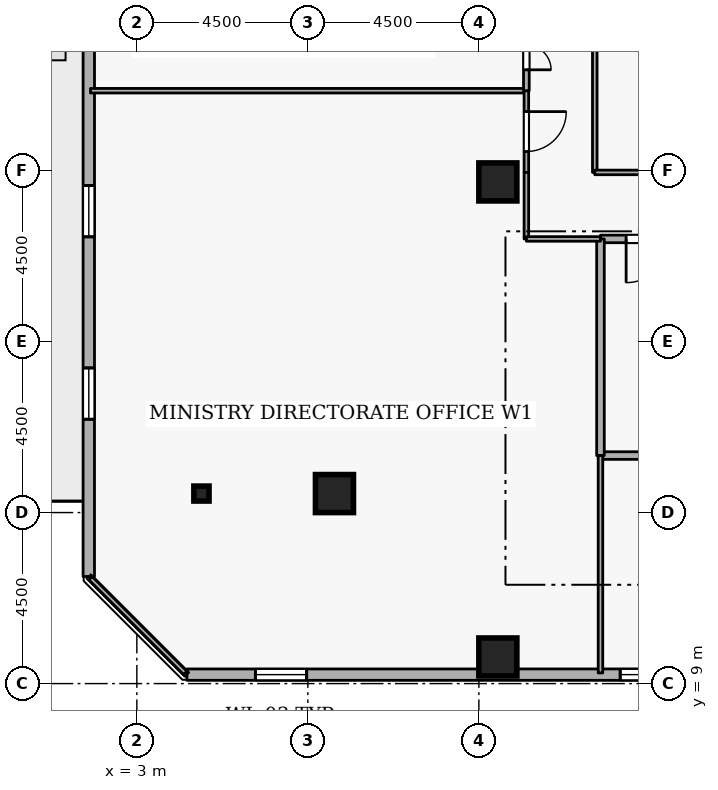
"""IFC4 building model, lengths in metres.
Left out: names, types, materials, properties, quantities, classifications, styles, units other than length and angle.
Written with IfcOpenShell. Run it as: python <this file> out.ifc"""

import sys

from ifc_helpers import new_model, si_unit, direction, frame, frame_2d, origin, origin_2d, place, context, subcontext, project, spatial, rectangle, i_section, extrude, element, fill, save


model = new_model("IFC4")
c1 = context("Model", 3, precision=1e-05, world=origin(), true_north=direction((0.0, 1.0)))
c2 = subcontext(c1, "Body", "Model", "MODEL_VIEW")
j1 = project(units=[si_unit("LENGTHUNIT", "METRE"), si_unit("PLANEANGLEUNIT", "RADIAN")], contexts=[c1])
p1 = place(None, origin())
s1 = spatial("IfcSite", under=j1, at=p1, CompositionType="ELEMENT")
p2 = place(p1, origin())
s2 = spatial("IfcBuilding", under=s1, at=p2, CompositionType="ELEMENT")
p3 = place(p2, frame((0.0, 0.0, 218.1)))
s3 = spatial("IfcBuildingStorey", under=s2, at=p3, CompositionType="ELEMENT", Elevation=218.1)
for number, where, z_axis, x_axis in (
    (1, (12.5, 9.7, 0.0), (0.0, 0.0, 1.0), (1.0, 0.0, 0.0)),
    (2, (8.2, 14.0, 0.0), (0.0, 0.0, 1.0), (1.0, 0.0, 0.0)),
    (3, (12.5, 22.2, 0.0), (0.0, 0.0, 1.0), (1.0, 0.0, 0.0)),
):
    element("IfcColumn", number, at=place(p3, frame(where, z_axis=z_axis, x_axis=x_axis)), inside=s3, PredefinedType="COLUMN", context=c2, shape_type="SweptSolid", body=[
        extrude(rectangle(XDim=1.0, YDim=1.0, at=origin_2d()), origin(), (0.0, 0.0, 1.0), 3.6),
    ])
p4 = place(p3, frame((4.7, 14.0, 0.0), z_axis=(0.0, 0.0, 1.0), x_axis=(1.0, 0.0, 0.0)))
e4 = element("IfcColumn", 4, at=p4, inside=s3, PredefinedType="COLUMN", context=c2, shape_type="SweptSolid", body=[
    extrude(i_section(OverallWidth=0.399, OverallDepth=0.394, WebThickness=0.023, FlangeThickness=0.037, FilletRadius=0.015, at=origin_2d()), origin(), (0.0, 0.0, 1.0), 3.6),
])
p5 = place(p3, frame((4.319, 9.235, 0.0), z_axis=(0.0, 0.0, 1.0), x_axis=(0.999999999634, 2.7061402e-05, 0.0)))
e5 = element("IfcWall", 5, at=p5, inside=s3, PredefinedType="STANDARD", context=c2, shape_type="SweptSolid", body=[
    extrude(rectangle(XDim=36.087, YDim=0.3, at=frame_2d((18.043, 0.0))), origin(), (0.0, 0.0, 1.0), 2.66),
])
p6 = place(p5, frame((1.8, 0.0, 0.72)))
e6 = element("IfcOpeningElement", 6, at=p6, cuts=e5, PredefinedType="OPENING", context=c2, shape_type="SweptSolid", body=[
    extrude(rectangle(XDim=1.35, YDim=1.05, at=frame_2d((0.675, 0.525))), frame((0.0, 0.16, 0.0), z_axis=(0.0, -1.0, 0.0), x_axis=(1.0, 0.0, 0.0)), (0.0, 0.0, 1.0), 0.32),
])
p7 = place(p5, frame((11.4, 0.0, 0.72)))
e7 = element("IfcOpeningElement", 7, at=p7, cuts=e5, PredefinedType="OPENING", context=c2, shape_type="SweptSolid", body=[
    extrude(rectangle(XDim=1.35, YDim=1.05, at=frame_2d((0.675, 0.525))), frame((0.0, 0.16, 0.0), z_axis=(0.0, -1.0, 0.0), x_axis=(1.0, 0.0, 0.0)), (0.0, 0.0, 1.0), 0.32),
])
p8 = place(p5, frame((16.2, 0.0, 0.72)))
e8 = element("IfcOpeningElement", 8, at=p8, cuts=e5, PredefinedType="OPENING", context=c2, shape_type="SweptSolid", body=[
    extrude(rectangle(XDim=1.35, YDim=1.05, at=frame_2d((0.675, 0.525))), frame((0.0, 0.16, 0.0), z_axis=(0.0, -1.0, 0.0), x_axis=(1.0, 0.0, 0.0)), (0.0, 0.0, 1.0), 0.32),
])
p9 = place(p5, frame((25.8, 0.0, 0.72)))
e9 = element("IfcOpeningElement", 9, at=p9, cuts=e5, PredefinedType="OPENING", context=c2, shape_type="SweptSolid", body=[
    extrude(rectangle(XDim=1.35, YDim=1.05, at=frame_2d((0.675, 0.525))), frame((0.0, 0.16, 0.0), z_axis=(0.0, -1.0, 0.0), x_axis=(1.0, 0.0, 0.0)), (0.0, 0.0, 1.0), 0.32),
])
p10 = place(p3, frame((1.736, 47.906, 0.0), z_axis=(0.0, 0.0, 1.0), x_axis=(-2.7061402e-05, -0.999999999634, 0.0)))
e10 = element("IfcWall", 10, at=p10, inside=s3, PredefinedType="STANDARD", context=c2, shape_type="SweptSolid", body=[
    extrude(rectangle(XDim=36.087, YDim=0.3, at=frame_2d((18.043, 0.0))), origin(), (0.0, 0.0, 1.0), 2.66),
])
p11 = place(p10, frame((19.393, 0.0, 0.0)))
e11 = element("IfcOpeningElement", 11, at=p11, cuts=e10, PredefinedType="OPENING", context=c2, shape_type="SweptSolid", body=[
    extrude(rectangle(XDim=1.0, YDim=2.08, at=frame_2d((0.5, 1.04))), frame((0.0, 0.16, 0.0), z_axis=(0.0, -1.0, 0.0), x_axis=(1.0, 0.0, 0.0)), (0.0, 0.0, 1.0), 0.32),
])
p12 = place(p10, frame((1.8, 0.0, 0.72)))
e12 = element("IfcOpeningElement", 12, at=p12, cuts=e10, PredefinedType="OPENING", context=c2, shape_type="SweptSolid", body=[
    extrude(rectangle(XDim=1.35, YDim=1.05, at=frame_2d((0.675, 0.525))), frame((0.0, 0.16, 0.0), z_axis=(0.0, -1.0, 0.0), x_axis=(1.0, 0.0, 0.0)), (0.0, 0.0, 1.0), 0.32),
])
p13 = place(p10, frame((6.6, 0.0, 0.72)))
e13 = element("IfcOpeningElement", 13, at=p13, cuts=e10, PredefinedType="OPENING", context=c2, shape_type="SweptSolid", body=[
    extrude(rectangle(XDim=1.35, YDim=1.05, at=frame_2d((0.675, 0.525))), frame((0.0, 0.16, 0.0), z_axis=(0.0, -1.0, 0.0), x_axis=(1.0, 0.0, 0.0)), (0.0, 0.0, 1.0), 0.32),
])
p14 = place(p10, frame((11.4, 0.0, 0.72)))
e14 = element("IfcOpeningElement", 14, at=p14, cuts=e10, PredefinedType="OPENING", context=c2, shape_type="SweptSolid", body=[
    extrude(rectangle(XDim=1.35, YDim=1.05, at=frame_2d((0.675, 0.525))), frame((0.0, 0.16, 0.0), z_axis=(0.0, -1.0, 0.0), x_axis=(1.0, 0.0, 0.0)), (0.0, 0.0, 1.0), 0.32),
])
p15 = place(p10, frame((16.2, 0.0, 0.72)))
e15 = element("IfcOpeningElement", 15, at=p15, cuts=e10, PredefinedType="OPENING", context=c2, shape_type="SweptSolid", body=[
    extrude(rectangle(XDim=1.35, YDim=1.05, at=frame_2d((0.675, 0.525))), frame((0.0, 0.16, 0.0), z_axis=(0.0, -1.0, 0.0), x_axis=(1.0, 0.0, 0.0)), (0.0, 0.0, 1.0), 0.32),
])
p16 = place(p10, frame((25.8, 0.0, 0.72)))
e16 = element("IfcOpeningElement", 16, at=p16, cuts=e10, PredefinedType="OPENING", context=c2, shape_type="SweptSolid", body=[
    extrude(rectangle(XDim=1.35, YDim=1.05, at=frame_2d((0.675, 0.525))), frame((0.0, 0.16, 0.0), z_axis=(0.0, -1.0, 0.0), x_axis=(1.0, 0.0, 0.0)), (0.0, 0.0, 1.0), 0.32),
])
p17 = place(p10, frame((30.6, 0.0, 0.72)))
e17 = element("IfcOpeningElement", 17, at=p17, cuts=e10, PredefinedType="OPENING", context=c2, shape_type="SweptSolid", body=[
    extrude(rectangle(XDim=1.35, YDim=1.05, at=frame_2d((0.675, 0.525))), frame((0.0, 0.16, 0.0), z_axis=(0.0, -1.0, 0.0), x_axis=(1.0, 0.0, 0.0)), (0.0, 0.0, 1.0), 0.32),
])
p18 = place(p3, frame((15.2, 15.0, 0.0), z_axis=(0.0, 0.0, 1.0), x_axis=(1.0, 0.0, 0.0)))
e18 = element("IfcWall", 18, at=p18, inside=s3, PredefinedType="STANDARD", context=c2, shape_type="SweptSolid", body=[
    extrude(rectangle(XDim=2.5, YDim=0.2, at=frame_2d((1.25, 0.0))), origin(), (0.0, 0.0, 1.0), 3.26),
])
p19 = place(p3, frame((17.7, 20.7, 0.0), z_axis=(0.0, 0.0, 1.0), x_axis=(-1.0, 0.0, 0.0)))
e19 = element("IfcWall", 19, at=p19, inside=s3, PredefinedType="STANDARD", context=c2, shape_type="SweptSolid", body=[
    extrude(rectangle(XDim=2.5, YDim=0.2, at=frame_2d((1.25, 0.0))), origin(), (0.0, 0.0, 1.0), 3.26),
])
p20 = place(p19, frame((0.675, 0.0, 0.0)))
e20 = element("IfcOpeningElement", 20, at=p20, cuts=e19, PredefinedType="OPENING", context=c2, shape_type="SweptSolid", body=[
    extrude(rectangle(XDim=1.15, YDim=2.1, at=frame_2d((0.575, 1.05))), frame((0.0, 0.11, 0.0), z_axis=(0.0, -1.0, 0.0), x_axis=(1.0, 0.0, 0.0)), (0.0, 0.0, 1.0), 0.22),
])
p21 = place(p3, frame((15.2, 20.7, 0.0), z_axis=(0.0, 0.0, 1.0), x_axis=(0.0, -1.0, 0.0)))
e21 = element("IfcWall", 21, at=p21, inside=s3, PredefinedType="STANDARD", context=c2, shape_type="SweptSolid", body=[
    extrude(rectangle(XDim=5.7, YDim=0.2, at=frame_2d((2.85, 0.0))), origin(), (0.0, 0.0, 1.0), 3.26),
])
p22 = place(p3, frame((1.78, 24.6, 0.0), z_axis=(0.0, 0.0, 1.0), x_axis=(1.0, 0.0, 0.0)))
e22 = element("IfcWall", 22, at=p22, inside=s3, PredefinedType="PARTITIONING", context=c2, shape_type="SweptSolid", body=[
    extrude(rectangle(XDim=11.47, YDim=0.12, at=frame_2d((5.735, 0.0))), origin(), (0.0, 0.0, 1.0), 3.26),
])
p23 = place(p3, frame((13.25, 24.6, 0.0), z_axis=(0.0, 0.0, 1.0), x_axis=(0.0, -1.0, 0.0)))
e23 = element("IfcWall", 23, at=p23, inside=s3, PredefinedType="PARTITIONING", context=c2, shape_type="SweptSolid", body=[
    extrude(rectangle(XDim=2.15, YDim=0.12, at=frame_2d((1.075, 0.0))), origin(), (0.0, 0.0, 1.0), 3.26),
])
p24 = place(p23, frame((0.55, 0.0, 0.0)))
e24 = element("IfcOpeningElement", 24, at=p24, cuts=e23, PredefinedType="OPENING", context=c2, shape_type="SweptSolid", body=[
    extrude(rectangle(XDim=1.05, YDim=2.1, at=frame_2d((0.525, 1.05))), frame((0.0, 0.07, 0.0), z_axis=(0.0, -1.0, 0.0), x_axis=(1.0, 0.0, 0.0)), (0.0, 0.0, 1.0), 0.14),
])
p25 = place(p3, frame((13.25, 22.45, 0.0), z_axis=(0.0, 0.0, 1.0), x_axis=(0.0, -1.0, 0.0)))
e25 = element("IfcWall", 25, at=p25, inside=s3, PredefinedType="PARTITIONING", context=c2, shape_type="SweptSolid", body=[
    extrude(rectangle(XDim=1.75, YDim=0.12, at=frame_2d((0.875, 0.0))), origin(), (0.0, 0.0, 1.0), 3.26),
])
p26 = place(p3, frame((13.25, 20.7, 0.0), z_axis=(0.0, 0.0, 1.0), x_axis=(1.0, 0.0, 0.0)))
e26 = element("IfcWall", 26, at=p26, inside=s3, PredefinedType="PARTITIONING", context=c2, shape_type="SweptSolid", body=[
    extrude(rectangle(XDim=1.95, YDim=0.12, at=frame_2d((0.975, 0.0))), origin(), (0.0, 0.0, 1.0), 3.26),
])
p27 = place(p3, frame((15.2, 15.0, 0.0), z_axis=(0.0, 0.0, 1.0), x_axis=(0.0, -1.0, 0.0)))
e27 = element("IfcWall", 27, at=p27, inside=s3, PredefinedType="PARTITIONING", context=c2, shape_type="SweptSolid", body=[
    extrude(rectangle(XDim=5.72, YDim=0.12, at=frame_2d((2.86, 0.0))), origin(), (0.0, 0.0, 1.0), 3.26),
])
p28 = place(p3, frame((4.275, 9.28, 0.0), z_axis=(0.0, 0.0, 1.0), x_axis=(-0.707106781187, 0.707106781187, 0.0)))
e28 = element("IfcWall", 28, at=p28, inside=s3, PredefinedType="PARTITIONING", context=c2, shape_type="SweptSolid", body=[
    extrude(rectangle(XDim=3.528, YDim=0.12, at=frame_2d((1.764, 0.0))), origin(), (0.0, 0.0, 1.0), 3.26),
])
p29 = place(p3, frame((13.25, 27.0, 0.0), z_axis=(0.0, 0.0, 1.0), x_axis=(0.0, -1.0, 0.0)))
e29 = element("IfcWall", 29, at=p29, inside=s3, PredefinedType="PARTITIONING", context=c2, shape_type="SweptSolid", body=[
    extrude(rectangle(XDim=2.4, YDim=0.15, at=frame_2d((1.2, 0.0))), origin(), (0.0, 0.0, 1.0), 3.26),
])
p30 = place(p29, frame((0.55, 0.0, 0.0)))
e30 = element("IfcOpeningElement", 30, at=p30, cuts=e29, PredefinedType="OPENING", context=c2, shape_type="SweptSolid", body=[
    extrude(rectangle(XDim=1.3, YDim=2.12, at=frame_2d((0.65, 1.06))), frame((0.0, 0.085, 0.0), z_axis=(0.0, -1.0, 0.0), x_axis=(1.0, 0.0, 0.0)), (0.0, 0.0, 1.0), 0.17),
])
p31 = place(p3, frame((15.05, 22.45, 0.0), z_axis=(0.0, 0.0, 1.0), x_axis=(0.0, 1.0, 0.0)))
e31 = element("IfcWall", 31, at=p31, inside=s3, PredefinedType="PARTITIONING", context=c2, shape_type="SweptSolid", body=[
    extrude(rectangle(XDim=3.75, YDim=0.12, at=frame_2d((1.875, 0.0))), origin(), (0.0, 0.0, 1.0), 3.26),
])
p32 = place(p3, frame((20.9, 22.45, 0.0), z_axis=(0.0, 0.0, 1.0), x_axis=(-1.0, 0.0, 0.0)))
e32 = element("IfcWall", 32, at=p32, inside=s3, PredefinedType="PARTITIONING", context=c2, shape_type="SweptSolid", body=[
    extrude(rectangle(XDim=5.85, YDim=0.12, at=frame_2d((2.925, 0.0))), origin(), (0.0, 0.0, 1.0), 3.26),
])
p33 = place(p32, frame((2.45, 0.0, 0.0)))
e33 = element("IfcOpeningElement", 33, at=p33, cuts=e32, PredefinedType="OPENING", context=c2, shape_type="SweptSolid", body=[
    extrude(rectangle(XDim=0.95, YDim=2.1, at=frame_2d((0.475, 1.05))), frame((0.0, 0.07, 0.0), z_axis=(0.0, -1.0, 0.0), x_axis=(1.0, 0.0, 0.0)), (0.0, 0.0, 1.0), 0.14),
])
p34 = place(p6, origin())
e34 = element("IfcWindow", 34, at=p34, inside=s3, PartitioningType="SINGLE_PANEL", PredefinedType="WINDOW", context=c2, shape_type="SweptSolid", body=[
    extrude(rectangle(XDim=1.35, YDim=1.05, at=frame_2d((0.675, 0.525))), frame((0.0, 0.03, 0.0), z_axis=(0.0, -1.0, 0.0), x_axis=(1.0, 0.0, 0.0)), (0.0, 0.0, 1.0), 0.06),
])
fill(e6, e34)
p35 = place(p7, origin())
e35 = element("IfcWindow", 35, at=p35, inside=s3, PartitioningType="SINGLE_PANEL", PredefinedType="WINDOW", context=c2, shape_type="SweptSolid", body=[
    extrude(rectangle(XDim=1.35, YDim=1.05, at=frame_2d((0.675, 0.525))), frame((0.0, 0.03, 0.0), z_axis=(0.0, -1.0, 0.0), x_axis=(1.0, 0.0, 0.0)), (0.0, 0.0, 1.0), 0.06),
])
fill(e7, e35)
p36 = place(p16, origin())
e36 = element("IfcWindow", 36, at=p36, inside=s3, PartitioningType="SINGLE_PANEL", PredefinedType="WINDOW", context=c2, shape_type="SweptSolid", body=[
    extrude(rectangle(XDim=1.35, YDim=1.05, at=frame_2d((0.675, 0.525))), frame((0.0, 0.03, 0.0), z_axis=(0.0, -1.0, 0.0), x_axis=(1.0, 0.0, 0.0)), (0.0, 0.0, 1.0), 0.06),
])
fill(e16, e36)
p37 = place(p17, origin())
e37 = element("IfcWindow", 37, at=p37, inside=s3, PartitioningType="SINGLE_PANEL", PredefinedType="WINDOW", context=c2, shape_type="SweptSolid", body=[
    extrude(rectangle(XDim=1.35, YDim=1.05, at=frame_2d((0.675, 0.525))), frame((0.0, 0.03, 0.0), z_axis=(0.0, -1.0, 0.0), x_axis=(1.0, 0.0, 0.0)), (0.0, 0.0, 1.0), 0.06),
])
fill(e17, e37)
p38 = place(p20, origin())
e38 = element("IfcDoor", 38, at=p38, inside=s3, OperationType="SINGLE_SWING_RIGHT", PredefinedType="DOOR", context=c2, shape_type="SweptSolid", body=[
    extrude(rectangle(XDim=1.15, YDim=2.1, at=frame_2d((0.575, 1.05))), frame((0.0, 0.025, 0.0), z_axis=(0.0, -1.0, 0.0), x_axis=(1.0, 0.0, 0.0)), (0.0, 0.0, 1.0), 0.05),
])
fill(e20, e38)
p39 = place(p24, origin())
e39 = element("IfcDoor", 39, at=p39, inside=s3, OperationType="SINGLE_SWING_LEFT", PredefinedType="DOOR", context=c2, shape_type="SweptSolid", body=[
    extrude(rectangle(XDim=1.05, YDim=2.1, at=frame_2d((0.525, 1.05))), frame((0.0, 0.025, 0.0), z_axis=(0.0, -1.0, 0.0), x_axis=(1.0, 0.0, 0.0)), (0.0, 0.0, 1.0), 0.05),
])
fill(e24, e39)
p40 = place(p30, origin())
e40 = element("IfcDoor", 40, at=p40, inside=s3, OperationType="DOUBLE_DOOR_SINGLE_SWING", PredefinedType="DOOR", context=c2, shape_type="SweptSolid", body=[
    extrude(rectangle(XDim=1.3, YDim=2.12, at=frame_2d((0.65, 1.06))), frame((0.0, 0.025, 0.0), z_axis=(0.0, -1.0, 0.0), x_axis=(1.0, 0.0, 0.0)), (0.0, 0.0, 1.0), 0.05),
])
fill(e30, e40)
save(model, sys.argv[1])
